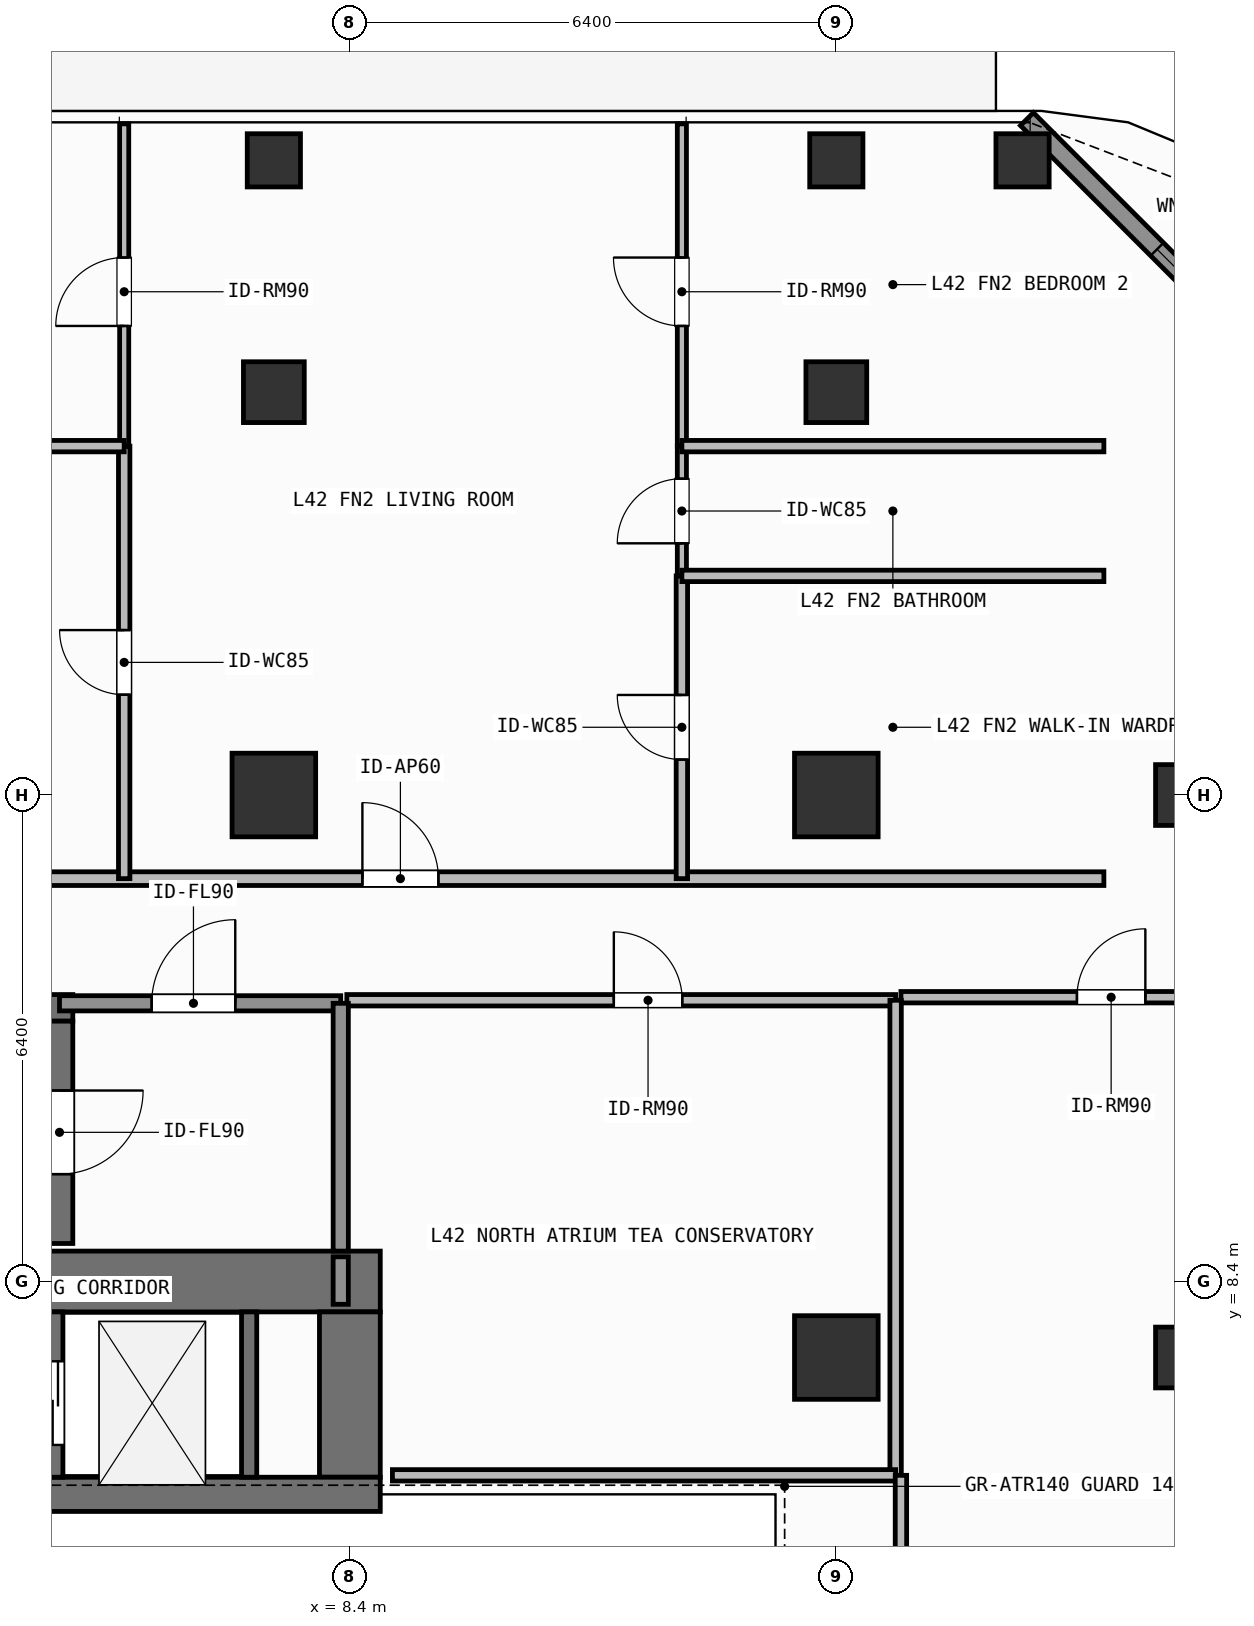
"""IFC4 building model, lengths in metres.
Left out: names, types, materials, properties, quantities, classifications, styles, units other than length and angle.
Written with IfcOpenShell. Run it as: python <this file> out.ifc"""

import sys

from ifc_helpers import new_model, si_unit, direction, frame, frame_2d, origin, origin_2d, place, context, subcontext, project, spatial, rectangle, hollow_rectangle, extrude, element, fill, save


model = new_model("IFC4")
c1 = context("Model", 3, precision=1e-05, world=origin(), true_north=direction((0.0, 1.0)))
c2 = subcontext(c1, "Body", "Model", "MODEL_VIEW")
j1 = project(units=[si_unit("LENGTHUNIT", "METRE"), si_unit("PLANEANGLEUNIT", "RADIAN")], contexts=[c1])
p1 = place(None, origin())
s1 = spatial("IfcSite", under=j1, at=p1, CompositionType="ELEMENT")
p2 = place(p1, origin())
s2 = spatial("IfcBuilding", under=s1, at=p2, CompositionType="ELEMENT")
p3 = place(p2, frame((0.0, 0.0, 171.9)))
s3 = spatial("IfcBuildingStorey", under=s2, at=p3, CompositionType="ELEMENT", Elevation=171.9)
p4 = place(p3, frame((-7.55, 8.4, 0.0), z_axis=(0.0, 0.0, 1.0), x_axis=(1.0, 0.0, 0.0)))
e1 = element("IfcWall", 1, at=p4, inside=s3, PredefinedType="SHEAR", context=c2, shape_type="SweptSolid", body=[
    extrude(rectangle(XDim=16.35, YDim=0.8, at=frame_2d((8.175, 0.0))), origin(), (0.0, 0.0, 1.0), 3.9),
])
p5 = place(p3, frame((8.4, 5.825, 0.0), z_axis=(0.0, 0.0, 1.0), x_axis=(0.0, 1.0, 0.0)))
e2 = element("IfcWall", 2, at=p5, inside=s3, PredefinedType="SHEAR", context=c2, shape_type="SweptSolid", body=[
    extrude(rectangle(XDim=2.175, YDim=0.8, at=frame_2d((1.087, 0.0))), origin(), (0.0, 0.0, 1.0), 3.9),
])
p6 = place(p3, frame((3.045, 5.6, 0.0), z_axis=(0.0, 0.0, 1.0), x_axis=(1.0, 0.0, 0.0)))
e3 = element("IfcWall", 3, at=p6, inside=s3, PredefinedType="SHEAR", context=c2, shape_type="SweptSolid", body=[
    extrude(rectangle(XDim=5.755, YDim=0.45, at=frame_2d((2.877, 0.0))), origin(), (0.0, 0.0, 1.0), 3.9),
])
p7 = place(p3, frame((-2.555, 12.0, 0.0), z_axis=(0.0, 0.0, 1.0), x_axis=(1.0, 0.0, 0.0)))
e4 = element("IfcWall", 4, at=p7, inside=s3, PredefinedType="SHEAR", context=c2, shape_type="SweptSolid", body=[
    extrude(rectangle(XDim=7.31, YDim=0.35, at=frame_2d((3.655, 0.0))), origin(), (0.0, 0.0, 1.0), 3.9),
])
p8 = place(p3, frame((4.58, 11.825, 0.0), z_axis=(0.0, 0.0, 1.0), x_axis=(0.0, -1.0, 0.0)))
e5 = element("IfcWall", 5, at=p8, inside=s3, PredefinedType="SHEAR", context=c2, shape_type="SweptSolid", body=[
    extrude(rectangle(XDim=2.925, YDim=0.35, at=frame_2d((1.462, 0.0))), origin(), (0.0, 0.0, 1.0), 3.9),
])
p9 = place(p8, frame((0.913, 0.0, 0.0)))
e6 = element("IfcOpeningElement", 6, at=p9, cuts=e5, PredefinedType="OPENING", context=c2, shape_type="SweptSolid", body=[
    extrude(rectangle(XDim=1.1, YDim=2.15, at=frame_2d((0.55, 1.075))), frame((0.0, 0.185, 0.0), z_axis=(0.0, -1.0, 0.0), x_axis=(1.0, 0.0, 0.0)), (0.0, 0.0, 1.0), 0.37),
])
for number, where, z_axis, x_axis in (
    (7, (7.4, 14.8, 0.0), (0.0, 0.0, 1.0), (1.0, 0.0, 0.0)),
    (8, (14.8, 14.8, 0.0), (0.0, 0.0, 1.0), (1.0, 0.0, 0.0)),
    (9, (14.8, 7.4, 0.0), (0.0, 0.0, 1.0), (1.0, 0.0, 0.0)),
):
    element("IfcColumn", number, at=place(p3, frame(where, z_axis=z_axis, x_axis=x_axis)), inside=s3, PredefinedType="COLUMN", context=c2, shape_type="SweptSolid", body=[
        extrude(rectangle(XDim=1.1, YDim=1.1, at=origin_2d()), origin(), (0.0, 0.0, 1.0), 3.9),
    ])
for number, where, z_axis, x_axis in (
    (10, (19.4, 7.4, 0.0), (0.0, 0.0, 1.0), (1.0, 0.0, 0.0)),
    (11, (19.4, 14.8, 0.0), (0.0, 0.0, 1.0), (1.0, 0.0, 0.0)),
    (12, (7.4, 20.1, 0.0), (0.0, 0.0, 1.0), (1.0, 0.0, 0.0)),
    (13, (14.8, 20.1, 0.0), (0.0, 0.0, 1.0), (1.0, 0.0, 0.0)),
):
    element("IfcColumn", number, at=place(p3, frame(where, z_axis=z_axis, x_axis=x_axis)), inside=s3, PredefinedType="COLUMN", context=c2, shape_type="SweptSolid", body=[
        extrude(hollow_rectangle(XDim=0.8, YDim=0.8, WallThickness=0.036, at=origin_2d()), origin(), (0.0, 0.0, 1.0), 3.9),
    ])
for number, where, z_axis, x_axis in (
    (14, (17.25, 23.15, 0.0), (0.0, 0.0, 1.0), (1.0, 0.0, 0.0)),
    (15, (7.4, 23.15, 0.0), (0.0, 0.0, 1.0), (1.0, 0.0, 0.0)),
    (16, (14.8, 23.15, 0.0), (0.0, 0.0, 1.0), (1.0, 0.0, 0.0)),
):
    element("IfcColumn", number, at=place(p3, frame(where, z_axis=z_axis, x_axis=x_axis)), inside=s3, PredefinedType="COLUMN", context=c2, shape_type="SweptSolid", body=[
        extrude(hollow_rectangle(XDim=0.7, YDim=0.7, WallThickness=0.032, at=origin_2d()), origin(), (0.0, 0.0, 1.0), 3.9),
    ])
p10 = place(p3, frame((17.308, 23.692, 0.0), z_axis=(0.0, 0.0, 1.0), x_axis=(0.707106781187, -0.707106781187, 0.0)))
e17 = element("IfcWall", 17, at=p10, inside=s3, PredefinedType="SOLIDWALL", context=c2, shape_type="SweptSolid", body=[
    extrude(rectangle(XDim=6.343, YDim=0.24, at=frame_2d((3.171, 0.0))), origin(), (0.0, 0.0, 1.0), 3.68),
])
p11 = place(p10, frame((2.421, 0.0, 0.8)))
e18 = element("IfcOpeningElement", 18, at=p11, cuts=e17, PredefinedType="OPENING", context=c2, shape_type="SweptSolid", body=[
    extrude(rectangle(XDim=1.5, YDim=1.85, at=frame_2d((0.75, 0.925))), frame((0.0, 0.13, 0.0), z_axis=(0.0, -1.0, 0.0), x_axis=(1.0, 0.0, 0.0)), (0.0, 0.0, 1.0), 0.26),
])
p12 = place(p3, frame((4.525, 5.825, 0.0), z_axis=(0.0, 0.0, 1.0), x_axis=(0.0, 1.0, 0.0)))
e19 = element("IfcWall", 19, at=p12, inside=s3, PredefinedType="SHEAR", context=c2, shape_type="SweptSolid", body=[
    extrude(rectangle(XDim=2.175, YDim=0.2, at=frame_2d((1.087, 0.0))), origin(), (0.0, 0.0, 1.0), 3.68),
])
p13 = place(p12, frame((0.425, 0.0, 0.0)))
e20 = element("IfcOpeningElement", 20, at=p13, cuts=e19, PredefinedType="OPENING", context=c2, shape_type="SweptSolid", body=[
    extrude(rectangle(XDim=1.1, YDim=2.2, at=frame_2d((0.55, 1.1))), frame((0.0, 0.11, 0.0), z_axis=(0.0, -1.0, 0.0), x_axis=(1.0, 0.0, 0.0)), (0.0, 0.0, 1.0), 0.22),
])
p14 = place(p3, frame((7.075, 5.825, 0.0), z_axis=(0.0, 0.0, 1.0), x_axis=(0.0, 1.0, 0.0)))
e21 = element("IfcWall", 21, at=p14, inside=s3, PredefinedType="SHEAR", context=c2, shape_type="SweptSolid", body=[
    extrude(rectangle(XDim=2.175, YDim=0.2, at=frame_2d((1.087, 0.0))), origin(), (0.0, 0.0, 1.0), 3.68),
])
p15 = place(p3, frame((4.58, 12.06, 0.0), z_axis=(0.0, 0.0, 1.0), x_axis=(1.0, 0.0, 0.0)))
e22 = element("IfcWall", 22, at=p15, inside=s3, PredefinedType="SOLIDWALL", context=c2, shape_type="SweptSolid", body=[
    extrude(rectangle(XDim=3.7, YDim=0.2, at=frame_2d((1.85, 0.0))), origin(), (0.0, 0.0, 1.0), 3.68),
])
p16 = place(p15, frame((1.212, 0.0, 0.0)))
e23 = element("IfcOpeningElement", 23, at=p16, cuts=e22, PredefinedType="OPENING", context=c2, shape_type="SweptSolid", body=[
    extrude(rectangle(XDim=1.1, YDim=2.15, at=frame_2d((0.55, 1.075))), frame((0.0, 0.11, 0.0), z_axis=(0.0, -1.0, 0.0), x_axis=(1.0, 0.0, 0.0)), (0.0, 0.0, 1.0), 0.22),
])
p17 = place(p3, frame((8.36, 12.1, 0.0), z_axis=(0.0, 0.0, 1.0), x_axis=(1.0, 0.0, 0.0)))
e24 = element("IfcWall", 24, at=p17, inside=s3, PredefinedType="PARTITIONING", context=c2, shape_type="SweptSolid", body=[
    extrude(rectangle(XDim=7.22, YDim=0.15, at=frame_2d((3.61, 0.0))), origin(), (0.0, 0.0, 1.0), 3.68),
])
p18 = place(p17, frame((3.513, 0.0, 0.0)))
e25 = element("IfcOpeningElement", 25, at=p18, cuts=e24, PredefinedType="OPENING", context=c2, shape_type="SweptSolid", body=[
    extrude(rectangle(XDim=0.9, YDim=2.1, at=frame_2d((0.45, 1.05))), frame((0.0, 0.085, 0.0), z_axis=(0.0, -1.0, 0.0), x_axis=(1.0, 0.0, 0.0)), (0.0, 0.0, 1.0), 0.17),
])
p19 = place(p3, frame((0.526, 13.7, 0.0), z_axis=(0.0, 0.0, 1.0), x_axis=(1.0, 0.0, 0.0)))
e26 = element("IfcWall", 26, at=p19, inside=s3, PredefinedType="PARTITIONING", context=c2, shape_type="SweptSolid", body=[
    extrude(rectangle(XDim=17.794, YDim=0.18, at=frame_2d((8.897, 0.0))), origin(), (0.0, 0.0, 1.0), 3.68),
])
p20 = place(p19, frame((8.039, 0.0, 0.0)))
e27 = element("IfcOpeningElement", 27, at=p20, cuts=e26, PredefinedType="OPENING", context=c2, shape_type="SweptSolid", body=[
    extrude(rectangle(XDim=1.0, YDim=2.2, at=frame_2d((0.5, 1.1))), frame((0.0, 0.1, 0.0), z_axis=(0.0, -1.0, 0.0), x_axis=(1.0, 0.0, 0.0)), (0.0, 0.0, 1.0), 0.2),
])
p21 = place(p3, frame((5.431, 13.7, 0.0), z_axis=(0.0, 0.0, 1.0), x_axis=(0.0, 1.0, 0.0)))
e28 = element("IfcWall", 28, at=p21, inside=s3, PredefinedType="PARTITIONING", context=c2, shape_type="SweptSolid", body=[
    extrude(rectangle(XDim=5.69, YDim=0.15, at=frame_2d((2.845, 0.0))), origin(), (0.0, 0.0, 1.0), 3.68),
])
p22 = place(p21, frame((2.42, 0.0, 0.0)))
e29 = element("IfcOpeningElement", 29, at=p22, cuts=e28, PredefinedType="OPENING", context=c2, shape_type="SweptSolid", body=[
    extrude(rectangle(XDim=0.85, YDim=2.1, at=frame_2d((0.425, 1.05))), frame((0.0, 0.085, 0.0), z_axis=(0.0, -1.0, 0.0), x_axis=(1.0, 0.0, 0.0)), (0.0, 0.0, 1.0), 0.17),
])
p23 = place(p3, frame((5.431, 19.39, 0.0), z_axis=(0.0, 0.0, 1.0), x_axis=(0.0, 1.0, 0.0)))
e30 = element("IfcWall", 30, at=p23, inside=s3, PredefinedType="PARTITIONING", context=c2, shape_type="SweptSolid", body=[
    extrude(rectangle(XDim=4.24, YDim=0.12, at=frame_2d((2.12, 0.0))), origin(), (0.0, 0.0, 1.0), 3.68),
])
p24 = place(p23, frame((1.581, 0.0, 0.0)))
e31 = element("IfcOpeningElement", 31, at=p24, cuts=e30, PredefinedType="OPENING", context=c2, shape_type="SweptSolid", body=[
    extrude(rectangle(XDim=0.9, YDim=2.1, at=frame_2d((0.45, 1.05))), frame((0.0, 0.07, 0.0), z_axis=(0.0, -1.0, 0.0), x_axis=(1.0, 0.0, 0.0)), (0.0, 0.0, 1.0), 0.14),
])
p25 = place(p3, frame((12.768, 13.7, 0.0), z_axis=(0.0, 0.0, 1.0), x_axis=(0.0, 1.0, 0.0)))
e32 = element("IfcWall", 32, at=p25, inside=s3, PredefinedType="PARTITIONING", context=c2, shape_type="SweptSolid", body=[
    extrude(rectangle(XDim=3.983, YDim=0.15, at=frame_2d((1.992, 0.0))), origin(), (0.0, 0.0, 1.0), 3.68),
])
p26 = place(p25, frame((1.566, 0.0, 0.0)))
e33 = element("IfcOpeningElement", 33, at=p26, cuts=e32, PredefinedType="OPENING", context=c2, shape_type="SweptSolid", body=[
    extrude(rectangle(XDim=0.85, YDim=2.1, at=frame_2d((0.425, 1.05))), frame((0.0, 0.085, 0.0), z_axis=(0.0, -1.0, 0.0), x_axis=(1.0, 0.0, 0.0)), (0.0, 0.0, 1.0), 0.17),
])
p27 = place(p3, frame((12.768, 17.683, 0.0), z_axis=(0.0, 0.0, 1.0), x_axis=(0.0, 1.0, 0.0)))
e34 = element("IfcWall", 34, at=p27, inside=s3, PredefinedType="PARTITIONING", context=c2, shape_type="SweptSolid", body=[
    extrude(rectangle(XDim=1.707, YDim=0.12, at=frame_2d((0.854, 0.0))), origin(), (0.0, 0.0, 1.0), 3.68),
])
p28 = place(p27, frame((0.428, 0.0, 0.0)))
e35 = element("IfcOpeningElement", 35, at=p28, cuts=e34, PredefinedType="OPENING", context=c2, shape_type="SweptSolid", body=[
    extrude(rectangle(XDim=0.85, YDim=2.1, at=frame_2d((0.425, 1.05))), frame((0.0, 0.07, 0.0), z_axis=(0.0, -1.0, 0.0), x_axis=(1.0, 0.0, 0.0)), (0.0, 0.0, 1.0), 0.14),
])
p29 = place(p3, frame((12.768, 19.39, 0.0), z_axis=(0.0, 0.0, 1.0), x_axis=(0.0, 1.0, 0.0)))
e36 = element("IfcWall", 36, at=p29, inside=s3, PredefinedType="PARTITIONING", context=c2, shape_type="SweptSolid", body=[
    extrude(rectangle(XDim=4.24, YDim=0.12, at=frame_2d((2.12, 0.0))), origin(), (0.0, 0.0, 1.0), 3.68),
])
p30 = place(p29, frame((1.581, 0.0, 0.0)))
e37 = element("IfcOpeningElement", 37, at=p30, cuts=e36, PredefinedType="OPENING", context=c2, shape_type="SweptSolid", body=[
    extrude(rectangle(XDim=0.9, YDim=2.1, at=frame_2d((0.45, 1.05))), frame((0.0, 0.07, 0.0), z_axis=(0.0, -1.0, 0.0), x_axis=(1.0, 0.0, 0.0)), (0.0, 0.0, 1.0), 0.14),
])
p31 = place(p3, frame((15.65, 12.14, 0.0), z_axis=(0.0, 0.0, 1.0), x_axis=(1.0, 0.0, 0.0)))
e38 = element("IfcWall", 38, at=p31, inside=s3, PredefinedType="PARTITIONING", context=c2, shape_type="SweptSolid", body=[
    extrude(rectangle(XDim=6.07, YDim=0.15, at=frame_2d((3.035, 0.0))), origin(), (0.0, 0.0, 1.0), 3.68),
])
p32 = place(p31, frame((2.316, 0.0, 0.0)))
e39 = element("IfcOpeningElement", 39, at=p32, cuts=e38, PredefinedType="OPENING", context=c2, shape_type="SweptSolid", body=[
    extrude(rectangle(XDim=0.9, YDim=2.1, at=frame_2d((0.45, 1.05))), frame((0.0, 0.085, 0.0), z_axis=(0.0, -1.0, 0.0), x_axis=(1.0, 0.0, 0.0)), (0.0, 0.0, 1.0), 0.17),
])
p33 = place(p3, frame((8.28, 8.8, 0.0), z_axis=(0.0, 0.0, 1.0), x_axis=(0.0, 1.0, 0.0)))
e40 = element("IfcWall", 40, at=p33, inside=s3, PredefinedType="SOLIDWALL", context=c2, shape_type="SweptSolid", body=[
    extrude(rectangle(XDim=3.26, YDim=0.2, at=frame_2d((1.63, 0.0))), origin(), (0.0, 0.0, 1.0), 3.68),
])
p34 = place(p3, frame((8.28, 8.1, 0.0), z_axis=(0.0, 0.0, 1.0), x_axis=(0.0, 1.0, 0.0)))
e41 = element("IfcWall", 41, at=p34, inside=s3, PredefinedType="SOLIDWALL", context=c2, shape_type="SweptSolid", body=[
    extrude(rectangle(XDim=0.625, YDim=0.2, at=frame_2d((0.312, 0.0))), origin(), (0.0, 0.0, 1.0), 3.68),
])
p35 = place(p3, frame((15.58, 5.85, 0.0), z_axis=(0.0, 0.0, 1.0), x_axis=(0.0, 1.0, 0.0)))
e42 = element("IfcWall", 42, at=p35, inside=s3, PredefinedType="PARTITIONING", context=c2, shape_type="SweptSolid", body=[
    extrude(rectangle(XDim=6.25, YDim=0.15, at=frame_2d((3.125, 0.0))), origin(), (0.0, 0.0, 1.0), 3.68),
])
p36 = place(p3, frame((8.96, 5.85, 0.0), z_axis=(0.0, 0.0, 1.0), x_axis=(1.0, 0.0, 0.0)))
e43 = element("IfcWall", 43, at=p36, inside=s3, PredefinedType="PARTITIONING", context=c2, shape_type="SweptSolid", body=[
    extrude(rectangle(XDim=6.62, YDim=0.15, at=frame_2d((3.31, 0.0))), origin(), (0.0, 0.0, 1.0), 3.68),
])
p37 = place(p3, frame((0.526, 19.39, 0.0), z_axis=(0.0, 0.0, 1.0), x_axis=(1.0, 0.0, 0.0)))
e44 = element("IfcWall", 44, at=p37, inside=s3, PredefinedType="PARTITIONING", context=c2, shape_type="SweptSolid", body=[
    extrude(rectangle(XDim=4.905, YDim=0.15, at=frame_2d((2.453, 0.0))), origin(), (0.0, 0.0, 1.0), 3.68),
])
for number, where, z_axis, x_axis in (
    (45, (12.768, 17.683, 0.0), (0.0, 0.0, 1.0), (1.0, 0.0, 0.0)),
    (46, (12.768, 19.39, 0.0), (0.0, 0.0, 1.0), (1.0, 0.0, 0.0)),
):
    element("IfcWall", number, at=place(p3, frame(where, z_axis=z_axis, x_axis=x_axis)), inside=s3, PredefinedType="PARTITIONING", context=c2, shape_type="SweptSolid", body=[
        extrude(rectangle(XDim=5.552, YDim=0.15, at=frame_2d((2.776, 0.0))), origin(), (0.0, 0.0, 1.0), 3.68),
    ])
p38 = place(p3, frame((15.65, -3.7, 0.0), z_axis=(0.0, 0.0, 1.0), x_axis=(0.0, 1.0, 0.0)))
e47 = element("IfcWall", 47, at=p38, inside=s3, PredefinedType="PARTITIONING", context=c2, shape_type="SweptSolid", body=[
    extrude(rectangle(XDim=9.55, YDim=0.15, at=frame_2d((4.775, 0.0))), origin(), (0.0, 0.0, 1.0), 3.68),
])
p39 = place(p11, origin())
e48 = element("IfcWindow", 48, at=p39, inside=s3, PartitioningType="SINGLE_PANEL", PredefinedType="WINDOW", context=c2, shape_type="SweptSolid", body=[
    extrude(rectangle(XDim=1.5, YDim=1.85, at=frame_2d((0.75, 0.925))), frame((0.0, 0.03, 0.0), z_axis=(0.0, -1.0, 0.0), x_axis=(1.0, 0.0, 0.0)), (0.0, 0.0, 1.0), 0.06),
])
fill(e18, e48)
p40 = place(p13, origin())
e49 = element("IfcDoor", 49, at=p40, inside=s3, OperationType="SLIDING_TO_LEFT", PredefinedType="DOOR", context=c2, shape_type="SweptSolid", body=[
    extrude(rectangle(XDim=1.1, YDim=2.2, at=frame_2d((0.55, 1.1))), frame((0.0, 0.025, 0.0), z_axis=(0.0, -1.0, 0.0), x_axis=(1.0, 0.0, 0.0)), (0.0, 0.0, 1.0), 0.05),
])
fill(e20, e49)
p41 = place(p9, origin())
e50 = element("IfcDoor", 50, at=p41, inside=s3, OperationType="SINGLE_SWING_LEFT", PredefinedType="DOOR", context=c2, shape_type="SweptSolid", body=[
    extrude(rectangle(XDim=1.1, YDim=2.15, at=frame_2d((0.55, 1.075))), frame((0.0, 0.025, 0.0), z_axis=(0.0, -1.0, 0.0), x_axis=(1.0, 0.0, 0.0)), (0.0, 0.0, 1.0), 0.05),
])
fill(e6, e50)
p42 = place(p16, origin())
e51 = element("IfcDoor", 51, at=p42, inside=s3, OperationType="SINGLE_SWING_RIGHT", PredefinedType="DOOR", context=c2, shape_type="SweptSolid", body=[
    extrude(rectangle(XDim=1.1, YDim=2.15, at=frame_2d((0.55, 1.075))), frame((0.0, 0.025, 0.0), z_axis=(0.0, -1.0, 0.0), x_axis=(1.0, 0.0, 0.0)), (0.0, 0.0, 1.0), 0.05),
])
fill(e23, e51)
p43 = place(p18, origin())
e52 = element("IfcDoor", 52, at=p43, inside=s3, OperationType="SINGLE_SWING_LEFT", PredefinedType="DOOR", context=c2, shape_type="SweptSolid", body=[
    extrude(rectangle(XDim=0.9, YDim=2.1, at=frame_2d((0.45, 1.05))), frame((0.0, 0.025, 0.0), z_axis=(0.0, -1.0, 0.0), x_axis=(1.0, 0.0, 0.0)), (0.0, 0.0, 1.0), 0.05),
])
fill(e25, e52)
p44 = place(p20, origin())
e53 = element("IfcDoor", 53, at=p44, inside=s3, OperationType="SINGLE_SWING_LEFT", PredefinedType="DOOR", context=c2, shape_type="SweptSolid", body=[
    extrude(rectangle(XDim=1.0, YDim=2.2, at=frame_2d((0.5, 1.1))), frame((0.0, 0.025, 0.0), z_axis=(0.0, -1.0, 0.0), x_axis=(1.0, 0.0, 0.0)), (0.0, 0.0, 1.0), 0.05),
])
fill(e27, e53)
p45 = place(p22, origin())
e54 = element("IfcDoor", 54, at=p45, inside=s3, OperationType="SINGLE_SWING_RIGHT", PredefinedType="DOOR", context=c2, shape_type="SweptSolid", body=[
    extrude(rectangle(XDim=0.85, YDim=2.1, at=frame_2d((0.425, 1.05))), frame((0.0, 0.025, 0.0), z_axis=(0.0, -1.0, 0.0), x_axis=(1.0, 0.0, 0.0)), (0.0, 0.0, 1.0), 0.05),
])
fill(e29, e54)
p46 = place(p24, origin())
e55 = element("IfcDoor", 55, at=p46, inside=s3, OperationType="SINGLE_SWING_LEFT", PredefinedType="DOOR", context=c2, shape_type="SweptSolid", body=[
    extrude(rectangle(XDim=0.9, YDim=2.1, at=frame_2d((0.45, 1.05))), frame((0.0, 0.025, 0.0), z_axis=(0.0, -1.0, 0.0), x_axis=(1.0, 0.0, 0.0)), (0.0, 0.0, 1.0), 0.05),
])
fill(e31, e55)
p47 = place(p26, origin())
e56 = element("IfcDoor", 56, at=p47, inside=s3, OperationType="SINGLE_SWING_RIGHT", PredefinedType="DOOR", context=c2, shape_type="SweptSolid", body=[
    extrude(rectangle(XDim=0.85, YDim=2.1, at=frame_2d((0.425, 1.05))), frame((0.0, 0.025, 0.0), z_axis=(0.0, -1.0, 0.0), x_axis=(1.0, 0.0, 0.0)), (0.0, 0.0, 1.0), 0.05),
])
fill(e33, e56)
p48 = place(p28, origin())
e57 = element("IfcDoor", 57, at=p48, inside=s3, OperationType="SINGLE_SWING_LEFT", PredefinedType="DOOR", context=c2, shape_type="SweptSolid", body=[
    extrude(rectangle(XDim=0.85, YDim=2.1, at=frame_2d((0.425, 1.05))), frame((0.0, 0.025, 0.0), z_axis=(0.0, -1.0, 0.0), x_axis=(1.0, 0.0, 0.0)), (0.0, 0.0, 1.0), 0.05),
])
fill(e35, e57)
p49 = place(p30, origin())
e58 = element("IfcDoor", 58, at=p49, inside=s3, OperationType="SINGLE_SWING_RIGHT", PredefinedType="DOOR", context=c2, shape_type="SweptSolid", body=[
    extrude(rectangle(XDim=0.9, YDim=2.1, at=frame_2d((0.45, 1.05))), frame((0.0, 0.025, 0.0), z_axis=(0.0, -1.0, 0.0), x_axis=(1.0, 0.0, 0.0)), (0.0, 0.0, 1.0), 0.05),
])
fill(e37, e58)
p50 = place(p32, origin())
e59 = element("IfcDoor", 59, at=p50, inside=s3, OperationType="SINGLE_SWING_RIGHT", PredefinedType="DOOR", context=c2, shape_type="SweptSolid", body=[
    extrude(rectangle(XDim=0.9, YDim=2.1, at=frame_2d((0.45, 1.05))), frame((0.0, 0.025, 0.0), z_axis=(0.0, -1.0, 0.0), x_axis=(1.0, 0.0, 0.0)), (0.0, 0.0, 1.0), 0.05),
])
fill(e39, e59)
save(model, sys.argv[1])
